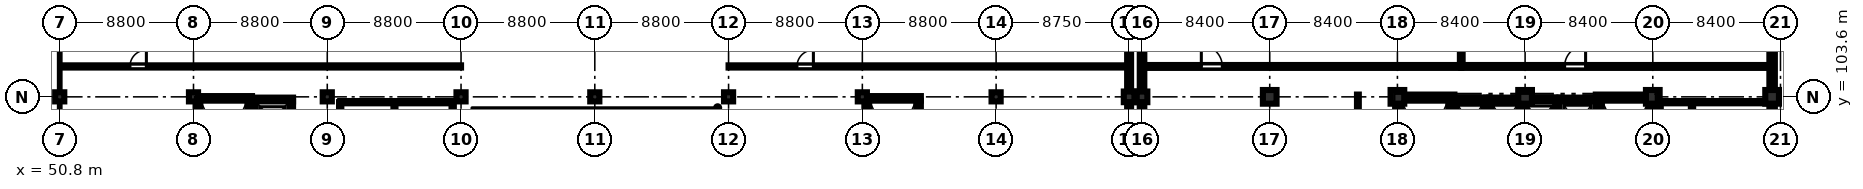
"""IFC4 building model, lengths in metres.
Left out: names, types, materials, properties, quantities, classifications, styles, units other than length and angle.
Written with IfcOpenShell. Run it as: python <this file> out.ifc"""

import sys

from ifc_helpers import new_model, si_unit, direction, frame, frame_2d, origin, origin_2d, place, context, subcontext, project, spatial, rectangle, extrude, element, fill, save


model = new_model("IFC4")
c1 = context("Model", 3, precision=1e-05, world=origin(), true_north=direction((0.0, 1.0)))
c2 = subcontext(c1, "Body", "Model", "MODEL_VIEW")
j1 = project(units=[si_unit("LENGTHUNIT", "METRE"), si_unit("PLANEANGLEUNIT", "RADIAN")], contexts=[c1])
p1 = place(None, origin())
s1 = spatial("IfcSite", under=j1, at=p1, CompositionType="ELEMENT")
p2 = place(p1, origin())
s2 = spatial("IfcBuilding", under=s1, at=p2, CompositionType="ELEMENT")
p3 = place(p2, frame((0.0, 0.0, 14.7)))
s3 = spatial("IfcBuildingStorey", under=s2, at=p3, CompositionType="ELEMENT", Elevation=14.7)
for number, where, z_axis, x_axis in (
    (1, (50.8, 103.6, 0.0), (0.0, 0.0, 1.0), (1.0, 0.0, 0.0)),
    (2, (59.6, 103.6, 0.0), (0.0, 0.0, 1.0), (1.0, 0.0, 0.0)),
    (3, (68.4, 103.6, 0.0), (0.0, 0.0, 1.0), (1.0, 0.0, 0.0)),
    (4, (77.2, 103.6, 0.0), (0.0, 0.0, 1.0), (1.0, 0.0, 0.0)),
    (5, (86.0, 103.6, 0.0), (0.0, 0.0, 1.0), (1.0, 0.0, 0.0)),
    (6, (94.8, 103.6, 0.0), (0.0, 0.0, 1.0), (1.0, 0.0, 0.0)),
    (7, (103.6, 103.6, 0.0), (0.0, 0.0, 1.0), (1.0, 0.0, 0.0)),
    (8, (112.4, 103.6, 0.0), (0.0, 0.0, 1.0), (1.0, 0.0, 0.0)),
):
    element("IfcColumn", number, at=place(p3, frame(where, z_axis=z_axis, x_axis=x_axis)), inside=s3, PredefinedType="COLUMN", context=c2, shape_type="SweptSolid", body=[
        extrude(rectangle(XDim=0.6, YDim=0.6, at=origin_2d()), origin(), (0.0, 0.0, 1.0), 4.5),
    ])
p4 = place(p3, frame((121.15, 103.6, 0.0), z_axis=(0.0, 0.0, 1.0), x_axis=(1.0, 0.0, 0.0)))
e9 = element("IfcColumn", 9, at=p4, inside=s3, PredefinedType="COLUMN", context=c2, shape_type="SweptSolid", body=[
    extrude(rectangle(XDim=0.7, YDim=0.7, at=origin_2d()), origin(), (0.0, 0.0, 1.0), 4.5),
])
p5 = place(p3, frame((122.0, 103.6, 0.0), z_axis=(0.0, 0.0, 1.0), x_axis=(1.0, 0.0, 0.0)))
e10 = element("IfcColumn", 10, at=p5, inside=s3, PredefinedType="COLUMN", context=c2, shape_type="SweptSolid", body=[
    extrude(rectangle(XDim=0.7, YDim=0.7, at=origin_2d()), origin(), (0.0, 0.0, 1.0), 4.26),
])
for number, where, z_axis, x_axis in (
    (11, (130.4, 103.6, 0.0), (0.0, 0.0, 1.0), (1.0, 0.0, 0.0)),
    (12, (138.8, 103.6, 0.0), (0.0, 0.0, 1.0), (1.0, 0.0, 0.0)),
    (13, (147.2, 103.6, 0.0), (0.0, 0.0, 1.0), (1.0, 0.0, 0.0)),
    (14, (155.6, 103.6, 0.0), (0.0, 0.0, 1.0), (1.0, 0.0, 0.0)),
    (15, (163.45, 103.6, 0.0), (0.0, 0.0, 1.0), (1.0, 0.0, 0.0)),
):
    element("IfcColumn", number, at=place(p3, frame(where, z_axis=z_axis, x_axis=x_axis)), inside=s3, PredefinedType="COLUMN", context=c2, shape_type="SweptSolid", body=[
        extrude(rectangle(XDim=0.9, YDim=0.9, at=origin_2d()), origin(), (0.0, 0.0, 1.0), 4.26),
    ])
p6 = place(p3, frame((138.65, 103.55, 0.0), z_axis=(0.0, 0.0, 1.0), x_axis=(1.0, 0.0, 0.0)))
e16 = element("IfcWall", 16, at=p6, inside=s3, PredefinedType="SHEAR", context=c2, shape_type="SweptSolid", body=[
    extrude(rectangle(XDim=3.9, YDim=0.4, at=frame_2d((1.95, 0.0))), origin(), (0.0, 0.0, 1.0), 4.26),
])
p7 = place(p3, frame((138.85, 95.45, 0.0), z_axis=(0.0, 0.0, 1.0), x_axis=(0.0, 1.0, 0.0)))
e17 = element("IfcWall", 17, at=p7, inside=s3, PredefinedType="SHEAR", context=c2, shape_type="SweptSolid", body=[
    extrude(rectangle(XDim=7.9, YDim=0.4, at=frame_2d((3.95, 0.0))), origin(), (0.0, 0.0, 1.0), 4.26),
])
p8 = place(p3, frame((142.35, 95.45, 0.0), z_axis=(0.0, 0.0, 1.0), x_axis=(0.0, 1.0, 0.0)))
e18 = element("IfcWall", 18, at=p8, inside=s3, PredefinedType="SHEAR", context=c2, shape_type="SweptSolid", body=[
    extrude(rectangle(XDim=7.9, YDim=0.4, at=frame_2d((3.95, 0.0))), origin(), (0.0, 0.0, 1.0), 4.26),
])
p9 = place(p8, frame((0.22, 0.0, 0.0)))
e19 = element("IfcOpeningElement", 19, at=p9, cuts=e18, PredefinedType="OPENING", context=c2, shape_type="SweptSolid", body=[
    extrude(rectangle(XDim=1.15, YDim=2.15, at=frame_2d((0.575, 1.075))), frame((0.0, 0.21, 0.0), z_axis=(0.0, -1.0, 0.0), x_axis=(1.0, 0.0, 0.0)), (0.0, 0.0, 1.0), 0.42),
])
p10 = place(p3, frame((151.85, 103.55, 0.0), z_axis=(0.0, 0.0, 1.0), x_axis=(1.0, 0.0, 0.0)))
e20 = element("IfcWall", 20, at=p10, inside=s3, PredefinedType="SHEAR", context=c2, shape_type="SweptSolid", body=[
    extrude(rectangle(XDim=3.9, YDim=0.4, at=frame_2d((1.95, 0.0))), origin(), (0.0, 0.0, 1.0), 4.26),
])
p11 = place(p3, frame((152.05, 95.45, 0.0), z_axis=(0.0, 0.0, 1.0), x_axis=(0.0, 1.0, 0.0)))
e21 = element("IfcWall", 21, at=p11, inside=s3, PredefinedType="SHEAR", context=c2, shape_type="SweptSolid", body=[
    extrude(rectangle(XDim=7.9, YDim=0.4, at=frame_2d((3.95, 0.0))), origin(), (0.0, 0.0, 1.0), 4.26),
])
p12 = place(p11, frame((0.35, 0.0, 0.0)))
e22 = element("IfcOpeningElement", 22, at=p12, cuts=e21, PredefinedType="OPENING", context=c2, shape_type="SweptSolid", body=[
    extrude(rectangle(XDim=1.15, YDim=2.15, at=frame_2d((0.575, 1.075))), frame((0.0, 0.21, 0.0), z_axis=(0.0, -1.0, 0.0), x_axis=(1.0, 0.0, 0.0)), (0.0, 0.0, 1.0), 0.42),
])
p13 = place(p3, frame((155.55, 95.45, 0.0), z_axis=(0.0, 0.0, 1.0), x_axis=(0.0, 1.0, 0.0)))
e23 = element("IfcWall", 23, at=p13, inside=s3, PredefinedType="SHEAR", context=c2, shape_type="SweptSolid", body=[
    extrude(rectangle(XDim=7.9, YDim=0.4, at=frame_2d((3.95, 0.0))), origin(), (0.0, 0.0, 1.0), 4.26),
])
p14 = place(p3, frame((59.75, 103.5, 0.0), z_axis=(0.0, 0.0, 1.0), x_axis=(1.0, 0.0, 0.0)))
e24 = element("IfcWall", 24, at=p14, inside=s3, PredefinedType="SHEAR", context=c2, shape_type="SweptSolid", body=[
    extrude(rectangle(XDim=3.7, YDim=0.3, at=frame_2d((1.85, 0.0))), origin(), (0.0, 0.0, 1.0), 4.5),
])
for number, where, z_axis, x_axis in (
    (25, (59.9, 95.45, 0.0), (0.0, 0.0, 1.0), (0.0, 1.0, 0.0)),
    (26, (63.3, 95.45, 0.0), (0.0, 0.0, 1.0), (0.0, 1.0, 0.0)),
):
    element("IfcWall", number, at=place(p3, frame(where, z_axis=z_axis, x_axis=x_axis)), inside=s3, PredefinedType="SHEAR", context=c2, shape_type="SweptSolid", body=[
        extrude(rectangle(XDim=7.9, YDim=0.3, at=frame_2d((3.95, 0.0))), origin(), (0.0, 0.0, 1.0), 4.5),
    ])
p15 = place(p3, frame((103.75, 103.5, 0.0), z_axis=(0.0, 0.0, 1.0), x_axis=(1.0, 0.0, 0.0)))
e27 = element("IfcWall", 27, at=p15, inside=s3, PredefinedType="SHEAR", context=c2, shape_type="SweptSolid", body=[
    extrude(rectangle(XDim=3.7, YDim=0.3, at=frame_2d((1.85, 0.0))), origin(), (0.0, 0.0, 1.0), 4.5),
])
for number, where, z_axis, x_axis in (
    (28, (103.9, 95.45, 0.0), (0.0, 0.0, 1.0), (0.0, 1.0, 0.0)),
    (29, (107.3, 95.45, 0.0), (0.0, 0.0, 1.0), (0.0, 1.0, 0.0)),
):
    element("IfcWall", number, at=place(p3, frame(where, z_axis=z_axis, x_axis=x_axis)), inside=s3, PredefinedType="SHEAR", context=c2, shape_type="SweptSolid", body=[
        extrude(rectangle(XDim=7.9, YDim=0.3, at=frame_2d((3.95, 0.0))), origin(), (0.0, 0.0, 1.0), 4.5),
    ])
p16 = place(p3, frame((142.55, 103.425, 0.0), z_axis=(0.0, 0.0, 1.0), x_axis=(1.0, 0.0, 0.0)))
e30 = element("IfcWall", 30, at=p16, inside=s3, PredefinedType="SHEAR", context=c2, shape_type="SweptSolid", body=[
    extrude(rectangle(XDim=2.05, YDim=0.25, at=frame_2d((1.025, 0.0))), origin(), (0.0, 0.0, 1.0), 4.26),
])
p17 = place(p3, frame((144.725, 100.15, 0.0), z_axis=(0.0, 0.0, 1.0), x_axis=(0.0, 1.0, 0.0)))
e31 = element("IfcWall", 31, at=p17, inside=s3, PredefinedType="SHEAR", context=c2, shape_type="SweptSolid", body=[
    extrude(rectangle(XDim=3.4, YDim=0.25, at=frame_2d((1.7, 0.0))), origin(), (0.0, 0.0, 1.0), 4.26),
])
p18 = place(p3, frame((144.85, 103.425, 0.0), z_axis=(0.0, 0.0, 1.0), x_axis=(1.0, 0.0, 0.0)))
e32 = element("IfcWall", 32, at=p18, inside=s3, PredefinedType="SHEAR", context=c2, shape_type="SweptSolid", body=[
    extrude(rectangle(XDim=2.05, YDim=0.25, at=frame_2d((1.025, 0.0))), origin(), (0.0, 0.0, 1.0), 4.26),
])
p19 = place(p3, frame((147.025, 100.15, 0.0), z_axis=(0.0, 0.0, 1.0), x_axis=(0.0, 1.0, 0.0)))
e33 = element("IfcWall", 33, at=p19, inside=s3, PredefinedType="SHEAR", context=c2, shape_type="SweptSolid", body=[
    extrude(rectangle(XDim=3.4, YDim=0.25, at=frame_2d((1.7, 0.0))), origin(), (0.0, 0.0, 1.0), 4.26),
])
p20 = place(p3, frame((147.15, 103.425, 0.0), z_axis=(0.0, 0.0, 1.0), x_axis=(1.0, 0.0, 0.0)))
e34 = element("IfcWall", 34, at=p20, inside=s3, PredefinedType="SHEAR", context=c2, shape_type="SweptSolid", body=[
    extrude(rectangle(XDim=2.05, YDim=0.25, at=frame_2d((1.025, 0.0))), origin(), (0.0, 0.0, 1.0), 4.26),
])
p21 = place(p3, frame((149.325, 100.35, 0.0), z_axis=(0.0, 0.0, 1.0), x_axis=(0.0, 1.0, 0.0)))
e35 = element("IfcWall", 35, at=p21, inside=s3, PredefinedType="SHEAR", context=c2, shape_type="SweptSolid", body=[
    extrude(rectangle(XDim=3.2, YDim=0.25, at=frame_2d((1.6, 0.0))), origin(), (0.0, 0.0, 1.0), 4.26),
])
p22 = place(p3, frame((149.45, 103.425, 0.0), z_axis=(0.0, 0.0, 1.0), x_axis=(1.0, 0.0, 0.0)))
e36 = element("IfcWall", 36, at=p22, inside=s3, PredefinedType="SHEAR", context=c2, shape_type="SweptSolid", body=[
    extrude(rectangle(XDim=2.4, YDim=0.25, at=frame_2d((1.2, 0.0))), origin(), (0.0, 0.0, 1.0), 4.26),
])
p23 = place(p3, frame((63.45, 103.425, 0.0), z_axis=(0.0, 0.0, 1.0), x_axis=(1.0, 0.0, 0.0)))
e37 = element("IfcWall", 37, at=p23, inside=s3, PredefinedType="SHEAR", context=c2, shape_type="SweptSolid", body=[
    extrude(rectangle(XDim=2.7, YDim=0.25, at=frame_2d((1.35, 0.0))), origin(), (0.0, 0.0, 1.0), 4.5),
])
for number, where, z_axis, x_axis in (
    (38, (63.575, 100.8, 0.0), (0.0, 0.0, 1.0), (0.0, 1.0, 0.0)),
    (39, (66.025, 100.8, 0.0), (0.0, 0.0, 1.0), (0.0, 1.0, 0.0)),
):
    element("IfcWall", number, at=place(p3, frame(where, z_axis=z_axis, x_axis=x_axis)), inside=s3, PredefinedType="SHEAR", context=c2, shape_type="SweptSolid", body=[
        extrude(rectangle(XDim=2.5, YDim=0.25, at=frame_2d((1.25, 0.0))), origin(), (0.0, 0.0, 1.0), 4.5),
    ])
p24 = place(p3, frame((121.15, 103.25, 0.0), z_axis=(0.0, 0.0, 1.0), x_axis=(0.0, -1.0, 0.0)))
e40 = element("IfcWall", 40, at=p24, inside=s3, PredefinedType="STANDARD", context=c2, shape_type="SweptSolid", body=[
    extrude(rectangle(XDim=7.7, YDim=0.26, at=frame_2d((3.85, 0.0))), origin(), (0.0, 0.0, 1.0), 4.3),
])
p25 = place(p3, frame((121.15, 111.1, 0.0), z_axis=(0.0, 0.0, 1.0), x_axis=(0.0, -1.0, 0.0)))
e41 = element("IfcWall", 41, at=p25, inside=s3, PredefinedType="STANDARD", context=c2, shape_type="SweptSolid", body=[
    extrude(rectangle(XDim=7.15, YDim=0.26, at=frame_2d((3.575, 0.0))), origin(), (0.0, 0.0, 1.0), 4.3),
])
p26 = place(p3, frame((163.45, 103.15, 0.0), z_axis=(0.0, 0.0, 1.0), x_axis=(0.0, -1.0, 0.0)))
e42 = element("IfcWall", 42, at=p26, inside=s3, PredefinedType="STANDARD", context=c2, shape_type="SweptSolid", body=[
    extrude(rectangle(XDim=7.5, YDim=0.36, at=frame_2d((3.75, 0.0))), origin(), (0.0, 0.0, 1.0), 3.56),
])
p27 = place(p26, frame((1.15, 0.0, 1.1)))
e43 = element("IfcOpeningElement", 43, at=p27, cuts=e42, PredefinedType="OPENING", context=c2, shape_type="SweptSolid", body=[
    extrude(rectangle(XDim=1.4, YDim=1.4, at=frame_2d((0.7, 0.7))), frame((0.0, 0.19, 0.0), z_axis=(0.0, -1.0, 0.0), x_axis=(1.0, 0.0, 0.0)), (0.0, 0.0, 1.0), 0.38),
])
p28 = place(p3, frame((163.45, 111.0, 0.0), z_axis=(0.0, 0.0, 1.0), x_axis=(0.0, -1.0, 0.0)))
e44 = element("IfcWall", 44, at=p28, inside=s3, PredefinedType="STANDARD", context=c2, shape_type="SweptSolid", body=[
    extrude(rectangle(XDim=6.95, YDim=0.36, at=frame_2d((3.475, 0.0))), origin(), (0.0, 0.0, 1.0), 3.56),
])
p29 = place(p28, frame((1.15, 0.0, 1.1)))
e45 = element("IfcOpeningElement", 45, at=p29, cuts=e44, PredefinedType="OPENING", context=c2, shape_type="SweptSolid", body=[
    extrude(rectangle(XDim=1.8, YDim=1.8, at=frame_2d((0.9, 0.9))), frame((0.0, 0.19, 0.0), z_axis=(0.0, -1.0, 0.0), x_axis=(1.0, 0.0, 0.0)), (0.0, 0.0, 1.0), 0.38),
])
p30 = place(p3, frame((122.0, 95.55, 0.0), z_axis=(0.0, 0.0, 1.0), x_axis=(0.0, 1.0, 0.0)))
e46 = element("IfcWall", 46, at=p30, inside=s3, PredefinedType="STANDARD", context=c2, shape_type="SweptSolid", body=[
    extrude(rectangle(XDim=7.7, YDim=0.3, at=frame_2d((3.85, 0.0))), origin(), (0.0, 0.0, 1.0), 3.51),
])
p31 = place(p3, frame((122.0, 103.95, 0.0), z_axis=(0.0, 0.0, 1.0), x_axis=(0.0, 1.0, 0.0)))
e47 = element("IfcWall", 47, at=p31, inside=s3, PredefinedType="STANDARD", context=c2, shape_type="SweptSolid", body=[
    extrude(rectangle(XDim=7.15, YDim=0.3, at=frame_2d((3.575, 0.0))), origin(), (0.0, 0.0, 1.0), 3.51),
])
p32 = place(p3, frame((69.25, 94.68, 0.0), z_axis=(0.0, 0.0, 1.0), x_axis=(0.0, 1.0, 0.0)))
e48 = element("IfcWall", 48, at=p32, inside=s3, PredefinedType="PARTITIONING", context=c2, shape_type="SweptSolid", body=[
    extrude(rectangle(XDim=8.57, YDim=0.15, at=frame_2d((4.285, 0.0))), origin(), (0.0, 0.0, 1.0), 4.25),
])
p33 = place(p3, frame((72.82, 94.68, 0.0), z_axis=(0.0, 0.0, 1.0), x_axis=(0.0, 1.0, 0.0)))
e49 = element("IfcWall", 49, at=p33, inside=s3, PredefinedType="PARTITIONING", context=c2, shape_type="SweptSolid", body=[
    extrude(rectangle(XDim=8.57, YDim=0.135, at=frame_2d((4.285, 0.0))), origin(), (0.0, 0.0, 1.0), 4.25),
])
p34 = place(p3, frame((69.25, 103.25, 0.0), z_axis=(0.0, 0.0, 1.0), x_axis=(1.0, 0.0, 0.0)))
e50 = element("IfcWall", 50, at=p34, inside=s3, PredefinedType="PARTITIONING", context=c2, shape_type="SweptSolid", body=[
    extrude(rectangle(XDim=7.4, YDim=0.15, at=frame_2d((3.7, 0.0))), origin(), (0.0, 0.0, 1.0), 4.25),
])
p35 = place(p3, frame((76.65, 94.68, 0.0), z_axis=(0.0, 0.0, 1.0), x_axis=(0.0, 1.0, 0.0)))
e51 = element("IfcWall", 51, at=p35, inside=s3, PredefinedType="PARTITIONING", context=c2, shape_type="SweptSolid", body=[
    extrude(rectangle(XDim=8.57, YDim=0.15, at=frame_2d((4.285, 0.0))), origin(), (0.0, 0.0, 1.0), 4.25),
])
p36 = place(p3, frame((50.92, 105.6, 0.0), z_axis=(0.0, 0.0, 1.0), x_axis=(1.0, 0.0, 0.0)))
e52 = element("IfcWall", 52, at=p36, inside=s3, PredefinedType="PARTITIONING", context=c2, shape_type="SweptSolid", body=[
    extrude(rectangle(XDim=26.28, YDim=0.145, at=frame_2d((13.14, 0.0))), origin(), (0.0, 0.0, 1.0), 4.25),
])
p37 = place(p36, frame((4.5, 0.0, 0.0)))
e53 = element("IfcOpeningElement", 53, at=p37, cuts=e52, PredefinedType="OPENING", context=c2, shape_type="SweptSolid", body=[
    extrude(rectangle(XDim=1.08, YDim=2.15, at=frame_2d((0.54, 1.075))), frame((0.0, 0.083, 0.0), z_axis=(0.0, -1.0, 0.0), x_axis=(1.0, 0.0, 0.0)), (0.0, 0.0, 1.0), 0.165),
])
p38 = place(p3, frame((94.8, 105.6, 0.0), z_axis=(0.0, 0.0, 1.0), x_axis=(1.0, 0.0, 0.0)))
e54 = element("IfcWall", 54, at=p38, inside=s3, PredefinedType="PARTITIONING", context=c2, shape_type="SweptSolid", body=[
    extrude(rectangle(XDim=26.22, YDim=0.145, at=frame_2d((13.11, 0.0))), origin(), (0.0, 0.0, 1.0), 4.25),
])
p39 = place(p38, frame((4.5, 0.0, 0.0)))
e55 = element("IfcOpeningElement", 55, at=p39, cuts=e54, PredefinedType="OPENING", context=c2, shape_type="SweptSolid", body=[
    extrude(rectangle(XDim=1.08, YDim=2.15, at=frame_2d((0.54, 1.075))), frame((0.0, 0.083, 0.0), z_axis=(0.0, -1.0, 0.0), x_axis=(1.0, 0.0, 0.0)), (0.0, 0.0, 1.0), 0.165),
])
p40 = place(p3, frame((158.18, 94.68, 0.0), z_axis=(0.0, 0.0, 1.0), x_axis=(0.0, 1.0, 0.0)))
e56 = element("IfcWall", 56, at=p40, inside=s3, PredefinedType="PARTITIONING", context=c2, shape_type="SweptSolid", body=[
    extrude(rectangle(XDim=8.57, YDim=0.15, at=frame_2d((4.285, 0.0))), origin(), (0.0, 0.0, 1.0), 4.26),
])
p41 = place(p40, frame((0.8, 0.0, 0.0)))
e57 = element("IfcOpeningElement", 57, at=p41, cuts=e56, PredefinedType="OPENING", context=c2, shape_type="SweptSolid", body=[
    extrude(rectangle(XDim=1.0, YDim=2.12, at=frame_2d((0.5, 1.06))), frame((0.0, 0.085, 0.0), z_axis=(0.0, -1.0, 0.0), x_axis=(1.0, 0.0, 0.0)), (0.0, 0.0, 1.0), 0.17),
])
p42 = place(p40, frame((3.5, 0.0, 0.0)))
e58 = element("IfcOpeningElement", 58, at=p42, cuts=e56, PredefinedType="OPENING", context=c2, shape_type="SweptSolid", body=[
    extrude(rectangle(XDim=0.92, YDim=2.1, at=frame_2d((0.46, 1.05))), frame((0.0, 0.085, 0.0), z_axis=(0.0, -1.0, 0.0), x_axis=(1.0, 0.0, 0.0)), (0.0, 0.0, 1.0), 0.17),
])
p43 = place(p40, frame((6.4, 0.0, 0.0)))
e59 = element("IfcOpeningElement", 59, at=p43, cuts=e56, PredefinedType="OPENING", context=c2, shape_type="SweptSolid", body=[
    extrude(rectangle(XDim=0.92, YDim=2.1, at=frame_2d((0.46, 1.05))), frame((0.0, 0.085, 0.0), z_axis=(0.0, -1.0, 0.0), x_axis=(1.0, 0.0, 0.0)), (0.0, 0.0, 1.0), 0.17),
])
p44 = place(p3, frame((156.05, 103.25, 0.0), z_axis=(0.0, 0.0, 1.0), x_axis=(1.0, 0.0, 0.0)))
e60 = element("IfcWall", 60, at=p44, inside=s3, PredefinedType="PARTITIONING", context=c2, shape_type="SweptSolid", body=[
    extrude(rectangle(XDim=7.15, YDim=0.15, at=frame_2d((3.575, 0.0))), origin(), (0.0, 0.0, 1.0), 4.26),
])
p45 = place(p3, frame((156.05, 94.68, 0.0), z_axis=(0.0, 0.0, 1.0), x_axis=(0.0, 1.0, 0.0)))
e61 = element("IfcWall", 61, at=p45, inside=s3, PredefinedType="PARTITIONING", context=c2, shape_type="SweptSolid", body=[
    extrude(rectangle(XDim=8.57, YDim=0.15, at=frame_2d((4.285, 0.0))), origin(), (0.0, 0.0, 1.0), 4.26),
])
p46 = place(p3, frame((136.2, 94.68, 0.0), z_axis=(0.0, 0.0, 1.0), x_axis=(0.0, 1.0, 0.0)))
e62 = element("IfcWall", 62, at=p46, inside=s3, PredefinedType="PARTITIONING", context=c2, shape_type="SweptSolid", body=[
    extrude(rectangle(XDim=9.07, YDim=0.12, at=frame_2d((4.535, 0.0))), origin(), (0.0, 0.0, 1.0), 4.26),
])
p47 = place(p3, frame((122.15, 105.6, 0.0), z_axis=(0.0, 0.0, 1.0), x_axis=(1.0, 0.0, 0.0)))
e63 = element("IfcWall", 63, at=p47, inside=s3, PredefinedType="SOLIDWALL", context=c2, shape_type="SweptSolid", body=[
    extrude(rectangle(XDim=20.85, YDim=0.19, at=frame_2d((10.425, 0.0))), origin(), (0.0, 0.0, 1.0), 4.26),
])
p48 = place(p47, frame((3.75, 0.0, 0.0)))
e64 = element("IfcOpeningElement", 64, at=p48, cuts=e63, PredefinedType="OPENING", context=c2, shape_type="SweptSolid", body=[
    extrude(rectangle(XDim=1.38, YDim=2.22, at=frame_2d((0.69, 1.11))), frame((0.0, 0.105, 0.0), z_axis=(0.0, -1.0, 0.0), x_axis=(1.0, 0.0, 0.0)), (0.0, 0.0, 1.0), 0.21),
])
p49 = place(p3, frame((143.0, 105.6, 0.0), z_axis=(0.0, 0.0, 1.0), x_axis=(1.0, 0.0, 0.0)))
e65 = element("IfcWall", 65, at=p49, inside=s3, PredefinedType="SOLIDWALL", context=c2, shape_type="SweptSolid", body=[
    extrude(rectangle(XDim=20.35, YDim=0.19, at=frame_2d((10.175, 0.0))), origin(), (0.0, 0.0, 1.0), 4.26),
])
p50 = place(p49, frame((6.8, 0.0, 0.0)))
e66 = element("IfcOpeningElement", 66, at=p50, cuts=e65, PredefinedType="OPENING", context=c2, shape_type="SweptSolid", body=[
    extrude(rectangle(XDim=1.38, YDim=2.22, at=frame_2d((0.69, 1.11))), frame((0.0, 0.105, 0.0), z_axis=(0.0, -1.0, 0.0), x_axis=(1.0, 0.0, 0.0)), (0.0, 0.0, 1.0), 0.21),
])
p51 = place(p3, frame((143.0, 105.6, 0.0), z_axis=(0.0, 0.0, 1.0), x_axis=(0.0, 1.0, 0.0)))
e67 = element("IfcWall", 67, at=p51, inside=s3, PredefinedType="STANDARD", context=c2, shape_type="SweptSolid", body=[
    extrude(rectangle(XDim=5.75, YDim=0.18, at=frame_2d((2.875, 0.0))), origin(), (0.0, 0.0, 1.0), 3.76),
])
p52 = place(p37, origin())
e68 = element("IfcDoor", 68, at=p52, inside=s3, OperationType="SINGLE_SWING_RIGHT", PredefinedType="DOOR", context=c2, shape_type="SweptSolid", body=[
    extrude(rectangle(XDim=1.08, YDim=2.15, at=frame_2d((0.54, 1.075))), frame((0.0, 0.025, 0.0), z_axis=(0.0, -1.0, 0.0), x_axis=(1.0, 0.0, 0.0)), (0.0, 0.0, 1.0), 0.05),
])
fill(e53, e68)
p53 = place(p39, origin())
e69 = element("IfcDoor", 69, at=p53, inside=s3, OperationType="SINGLE_SWING_RIGHT", PredefinedType="DOOR", context=c2, shape_type="SweptSolid", body=[
    extrude(rectangle(XDim=1.08, YDim=2.15, at=frame_2d((0.54, 1.075))), frame((0.0, 0.025, 0.0), z_axis=(0.0, -1.0, 0.0), x_axis=(1.0, 0.0, 0.0)), (0.0, 0.0, 1.0), 0.05),
])
fill(e55, e69)
p54 = place(p48, origin())
e70 = element("IfcDoor", 70, at=p54, inside=s3, OperationType="SINGLE_SWING_LEFT", PredefinedType="DOOR", context=c2, shape_type="SweptSolid", body=[
    extrude(rectangle(XDim=1.38, YDim=2.22, at=frame_2d((0.69, 1.11))), frame((0.0, 0.025, 0.0), z_axis=(0.0, -1.0, 0.0), x_axis=(1.0, 0.0, 0.0)), (0.0, 0.0, 1.0), 0.05),
])
fill(e64, e70)
p55 = place(p50, origin())
e71 = element("IfcDoor", 71, at=p55, inside=s3, OperationType="SINGLE_SWING_RIGHT", PredefinedType="DOOR", context=c2, shape_type="SweptSolid", body=[
    extrude(rectangle(XDim=1.38, YDim=2.22, at=frame_2d((0.69, 1.11))), frame((0.0, 0.025, 0.0), z_axis=(0.0, -1.0, 0.0), x_axis=(1.0, 0.0, 0.0)), (0.0, 0.0, 1.0), 0.05),
])
fill(e66, e71)
save(model, sys.argv[1])
